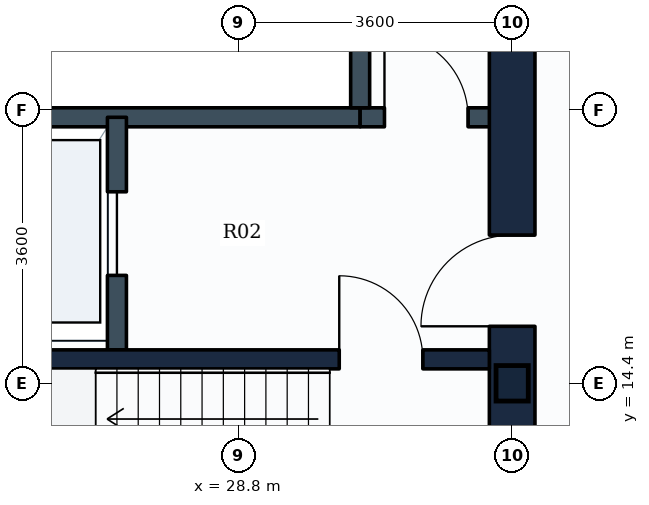
"""IFC4 building model, lengths in metres.
Left out: names, types, materials, properties, quantities, classifications, styles, units other than length and angle.
Written with IfcOpenShell. Run it as: python <this file> out.ifc"""

import sys

from ifc_helpers import new_model, si_unit, direction, frame, frame_2d, origin, origin_2d, place, context, subcontext, project, spatial, rectangle, i_section, extrude, element, fill, save


model = new_model("IFC4")
c1 = context("Model", 3, precision=1e-05, world=origin(), true_north=direction((0.0, 1.0)))
c2 = subcontext(c1, "Body", "Model", "MODEL_VIEW")
j1 = project(units=[si_unit("LENGTHUNIT", "METRE"), si_unit("PLANEANGLEUNIT", "RADIAN")], contexts=[c1])
p1 = place(None, origin())
s1 = spatial("IfcSite", under=j1, at=p1, CompositionType="ELEMENT")
p2 = place(p1, origin())
s2 = spatial("IfcBuilding", under=s1, at=p2, CompositionType="ELEMENT")
p3 = place(p2, frame((0.0, 0.0, 99.6)))
s3 = spatial("IfcBuildingStorey", under=s2, at=p3, CompositionType="ELEMENT", Elevation=99.6)
p4 = place(p3, frame((32.4, 14.4, 0.0), z_axis=(0.0, 0.0, 1.0), x_axis=(1.0, 0.0, 0.0)))
e1 = element("IfcColumn", 1, at=p4, inside=s3, PredefinedType="COLUMN", context=c2, shape_type="SweptSolid", body=[
    extrude(i_section(OverallWidth=0.424, OverallDepth=0.467, WebThickness=0.033, FlangeThickness=0.053, FilletRadius=0.015, at=origin_2d()), origin(), (0.0, 0.0, 1.0), 3.9),
])
p5 = place(p3, frame((32.4, 10.8, 0.0), z_axis=(0.0, 0.0, 1.0), x_axis=(0.0, 1.0, 0.0)))
e2 = element("IfcWall", 2, at=p5, inside=s3, PredefinedType="SHEAR", context=c2, shape_type="SweptSolid", body=[
    extrude(rectangle(XDim=14.4, YDim=0.6, at=frame_2d((7.2, 0.0))), origin(), (0.0, 0.0, 1.0), 3.65),
])
p6 = place(p5, frame((4.35, 0.0, 0.0)))
e3 = element("IfcOpeningElement", 3, at=p6, cuts=e2, PredefinedType="OPENING", context=c2, shape_type="SweptSolid", body=[
    extrude(rectangle(XDim=1.2, YDim=2.1, at=frame_2d((0.6, 1.05))), frame((0.0, 0.31, 0.0), z_axis=(0.0, -1.0, 0.0), x_axis=(1.0, 0.0, 0.0)), (0.0, 0.0, 1.0), 0.62),
])
p7 = place(p5, frame((10.0, 0.0, 0.0)))
e4 = element("IfcOpeningElement", 4, at=p7, cuts=e2, PredefinedType="OPENING", context=c2, shape_type="SweptSolid", body=[
    extrude(rectangle(XDim=1.2, YDim=2.1, at=frame_2d((0.6, 1.05))), frame((0.0, 0.31, 0.0), z_axis=(0.0, -1.0, 0.0), x_axis=(1.0, 0.0, 0.0)), (0.0, 0.0, 1.0), 0.62),
])
p8 = place(p3, frame((23.35, 14.715, 0.0), z_axis=(0.0, 0.0, 1.0), x_axis=(1.0, 0.0, 0.0)))
e5 = element("IfcWall", 5, at=p8, inside=s3, PredefinedType="SHEAR", context=c2, shape_type="SweptSolid", body=[
    extrude(rectangle(XDim=8.75, YDim=0.25, at=frame_2d((4.375, 0.0))), origin(), (0.0, 0.0, 1.0), 3.65),
])
p9 = place(p8, frame((6.775, 0.0, 0.0)))
e6 = element("IfcOpeningElement", 6, at=p9, cuts=e5, PredefinedType="OPENING", context=c2, shape_type="SweptSolid", body=[
    extrude(rectangle(XDim=1.1, YDim=2.1, at=frame_2d((0.55, 1.05))), frame((0.0, 0.135, 0.0), z_axis=(0.0, -1.0, 0.0), x_axis=(1.0, 0.0, 0.0)), (0.0, 0.0, 1.0), 0.27),
])
p10 = place(p3, frame((21.88, 17.9, 0.0), z_axis=(0.0, 0.0, 1.0), x_axis=(1.0, 0.0, 0.0)))
e7 = element("IfcWall", 7, at=p10, inside=s3, PredefinedType="PARTITIONING", context=c2, shape_type="SweptSolid", body=[
    extrude(rectangle(XDim=8.52, YDim=0.25, at=frame_2d((4.26, 0.0))), origin(), (0.0, 0.0, 1.0), 3.635),
])
p11 = place(p3, frame((30.4, 17.9, 0.0), z_axis=(0.0, 0.0, 1.0), x_axis=(1.0, 0.0, 0.0)))
e8 = element("IfcWall", 8, at=p11, inside=s3, PredefinedType="PARTITIONING", context=c2, shape_type="SweptSolid", body=[
    extrude(rectangle(XDim=1.75, YDim=0.25, at=frame_2d((0.875, 0.0))), origin(), (0.0, 0.0, 1.0), 3.635),
])
p12 = place(p11, frame((0.32, 0.0, 0.0)))
e9 = element("IfcOpeningElement", 9, at=p12, cuts=e8, PredefinedType="OPENING", context=c2, shape_type="SweptSolid", body=[
    extrude(rectangle(XDim=1.1, YDim=2.1, at=frame_2d((0.55, 1.05))), frame((0.0, 0.135, 0.0), z_axis=(0.0, -1.0, 0.0), x_axis=(1.0, 0.0, 0.0)), (0.0, 0.0, 1.0), 0.27),
])
p13 = place(p3, frame((27.2, 14.84, 0.0), z_axis=(0.0, 0.0, 1.0), x_axis=(0.0, 1.0, 0.0)))
e10 = element("IfcWall", 10, at=p13, inside=s3, PredefinedType="PARTITIONING", context=c2, shape_type="SweptSolid", body=[
    extrude(rectangle(XDim=3.06, YDim=0.25, at=frame_2d((1.53, 0.0))), origin(), (0.0, 0.0, 1.0), 3.635),
])
p14 = place(p13, frame((0.98, 0.0, 0.0)))
e11 = element("IfcOpeningElement", 11, at=p14, cuts=e10, PredefinedType="OPENING", context=c2, shape_type="SweptSolid", body=[
    extrude(rectangle(XDim=1.1, YDim=2.1, at=frame_2d((0.55, 1.05))), frame((0.0, 0.135, 0.0), z_axis=(0.0, -1.0, 0.0), x_axis=(1.0, 0.0, 0.0)), (0.0, 0.0, 1.0), 0.27),
])
p15 = place(p3, frame((30.4, 18.025, 0.0), z_axis=(0.0, 0.0, 1.0), x_axis=(0.0, 1.0, 0.0)))
e12 = element("IfcWall", 12, at=p15, inside=s3, PredefinedType="PARTITIONING", context=c2, shape_type="SweptSolid", body=[
    extrude(rectangle(XDim=2.27, YDim=0.25, at=frame_2d((1.135, 0.0))), origin(), (0.0, 0.0, 1.0), 3.635),
])
p16 = place(p9, origin())
e13 = element("IfcDoor", 13, at=p16, inside=s3, OperationType="SINGLE_SWING_LEFT", PredefinedType="DOOR", context=c2, shape_type="SweptSolid", body=[
    extrude(rectangle(XDim=1.1, YDim=2.1, at=frame_2d((0.55, 1.05))), frame((0.0, 0.025, 0.0), z_axis=(0.0, -1.0, 0.0), x_axis=(1.0, 0.0, 0.0)), (0.0, 0.0, 1.0), 0.05),
])
fill(e6, e13)
p17 = place(p14, origin())
e14 = element("IfcDoor", 14, at=p17, inside=s3, OperationType="SLIDING_TO_LEFT", PredefinedType="DOOR", context=c2, shape_type="SweptSolid", body=[
    extrude(rectangle(XDim=1.1, YDim=2.1, at=frame_2d((0.55, 1.05))), frame((0.0, 0.025, 0.0), z_axis=(0.0, -1.0, 0.0), x_axis=(1.0, 0.0, 0.0)), (0.0, 0.0, 1.0), 0.05),
])
fill(e11, e14)
p18 = place(p6, origin())
e15 = element("IfcDoor", 15, at=p18, inside=s3, OperationType="SINGLE_SWING_LEFT", PredefinedType="DOOR", context=c2, shape_type="SweptSolid", body=[
    extrude(rectangle(XDim=1.2, YDim=2.1, at=frame_2d((0.6, 1.05))), frame((0.0, 0.025, 0.0), z_axis=(0.0, -1.0, 0.0), x_axis=(1.0, 0.0, 0.0)), (0.0, 0.0, 1.0), 0.05),
])
fill(e3, e15)
p19 = place(p12, origin())
e16 = element("IfcDoor", 16, at=p19, inside=s3, OperationType="SINGLE_SWING_LEFT", PredefinedType="DOOR", context=c2, shape_type="SweptSolid", body=[
    extrude(rectangle(XDim=1.1, YDim=2.1, at=frame_2d((0.55, 1.05))), frame((0.0, 0.025, 0.0), z_axis=(0.0, -1.0, 0.0), x_axis=(1.0, 0.0, 0.0)), (0.0, 0.0, 1.0), 0.05),
])
fill(e9, e16)
save(model, sys.argv[1])
